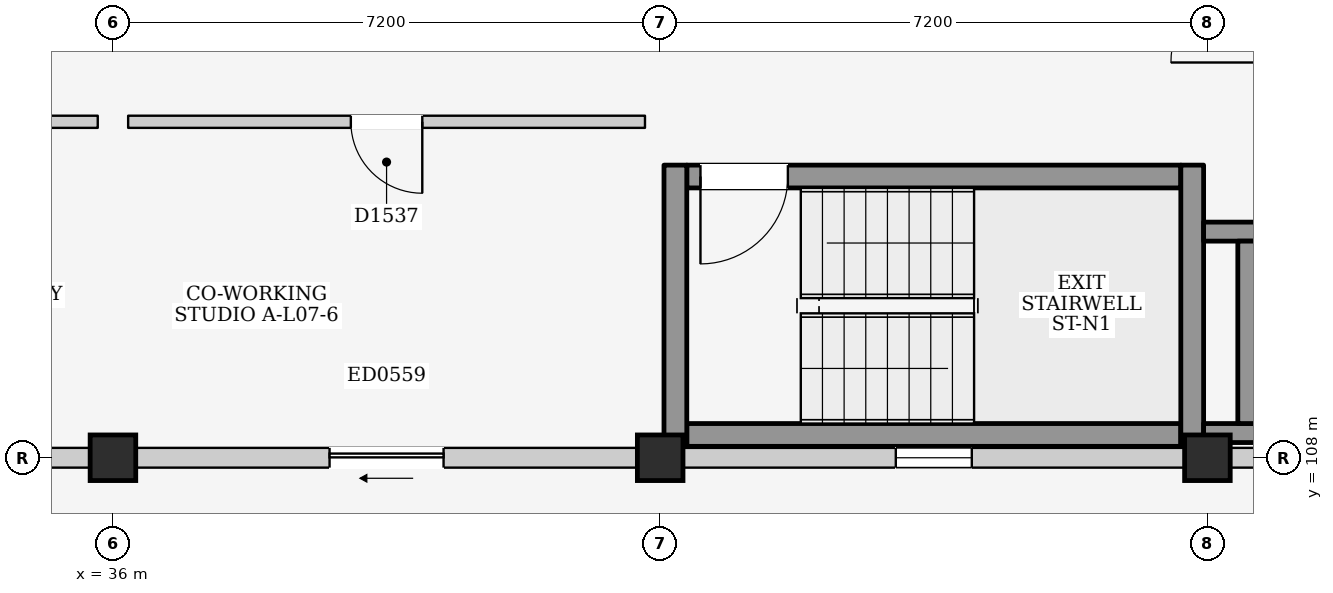
"""IFC4 building model, lengths in metres.
Left out: names, types, materials, properties, quantities, classifications, styles, units other than length and angle.
Written with IfcOpenShell. Run it as: python <this file> out.ifc"""

import sys

from ifc_helpers import new_model, si_unit, direction, frame, frame_2d, origin, origin_2d, place, context, subcontext, project, spatial, rectangle, extrude, element, fill, save


model = new_model("IFC4")
c1 = context("Model", 3, precision=1e-05, world=origin(), true_north=direction((0.0, 1.0)))
c2 = subcontext(c1, "Body", "Model", "MODEL_VIEW")
j1 = project(units=[si_unit("LENGTHUNIT", "METRE"), si_unit("PLANEANGLEUNIT", "RADIAN")], contexts=[c1])
p1 = place(None, origin())
s1 = spatial("IfcSite", under=j1, at=p1, CompositionType="ELEMENT")
p2 = place(p1, origin())
s2 = spatial("IfcBuilding", under=s1, at=p2, CompositionType="ELEMENT")
p3 = place(p2, frame((0.0, 0.0, 25.1)))
s3 = spatial("IfcBuildingStorey", under=s2, at=p3, CompositionType="ELEMENT", Elevation=25.1)
for number, where, z_axis, x_axis in (
    (1, (36.0, 108.0, 0.0), (0.0, 0.0, 1.0), (1.0, 0.0, 0.0)),
    (2, (43.2, 108.0, 0.0), (0.0, 0.0, 1.0), (1.0, 0.0, 0.0)),
    (3, (50.4, 108.0, 0.0), (0.0, 0.0, 1.0), (1.0, 0.0, 0.0)),
):
    element("IfcColumn", number, at=place(p3, frame(where, z_axis=z_axis, x_axis=x_axis)), inside=s3, PredefinedType="COLUMN", context=c2, shape_type="SweptSolid", body=[
        extrude(rectangle(XDim=0.6, YDim=0.6, at=origin_2d()), origin(), (0.0, 0.0, 1.0), 3.2),
    ])
p4 = place(p3, frame((29.1, 108.0, 0.0), z_axis=(0.0, 0.0, 1.0), x_axis=(1.0, 0.0, 0.0)))
e4 = element("IfcWall", 4, at=p4, inside=s3, PredefinedType="ELEMENTEDWALL", context=c2, shape_type="SweptSolid", body=[
    extrude(rectangle(XDim=6.6, YDim=0.26, at=frame_2d((3.3, 0.0))), origin(), (0.0, 0.0, 1.0), 2.325),
])
p5 = place(p4, frame((2.55, 0.0, 0.0)))
e5 = element("IfcOpeningElement", 5, at=p5, cuts=e4, PredefinedType="OPENING", context=c2, shape_type="SweptSolid", body=[
    extrude(rectangle(XDim=1.5, YDim=2.12, at=frame_2d((0.75, 1.06))), frame((0.0, 0.145, 0.0), z_axis=(0.0, -1.0, 0.0), x_axis=(1.0, 0.0, 0.0)), (0.0, 0.0, 1.0), 0.29),
])
p6 = place(p3, frame((36.3, 108.0, 0.0), z_axis=(0.0, 0.0, 1.0), x_axis=(1.0, 0.0, 0.0)))
e6 = element("IfcWall", 6, at=p6, inside=s3, PredefinedType="ELEMENTEDWALL", context=c2, shape_type="SweptSolid", body=[
    extrude(rectangle(XDim=6.6, YDim=0.26, at=frame_2d((3.3, 0.0))), origin(), (0.0, 0.0, 1.0), 2.325),
])
p7 = place(p6, frame((2.55, 0.0, 0.0)))
e7 = element("IfcOpeningElement", 7, at=p7, cuts=e6, PredefinedType="OPENING", context=c2, shape_type="SweptSolid", body=[
    extrude(rectangle(XDim=1.5, YDim=2.12, at=frame_2d((0.75, 1.06))), frame((0.0, 0.145, 0.0), z_axis=(0.0, -1.0, 0.0), x_axis=(1.0, 0.0, 0.0)), (0.0, 0.0, 1.0), 0.29),
])
p8 = place(p3, frame((43.5, 108.0, 0.0), z_axis=(0.0, 0.0, 1.0), x_axis=(1.0, 0.0, 0.0)))
e8 = element("IfcWall", 8, at=p8, inside=s3, PredefinedType="ELEMENTEDWALL", context=c2, shape_type="SweptSolid", body=[
    extrude(rectangle(XDim=6.6, YDim=0.26, at=frame_2d((3.3, 0.0))), origin(), (0.0, 0.0, 1.0), 2.325),
])
p9 = place(p8, frame((2.8, 0.0, 1.2)))
e9 = element("IfcOpeningElement", 9, at=p9, cuts=e8, PredefinedType="OPENING", context=c2, shape_type="SweptSolid", body=[
    extrude(rectangle(XDim=1.0, YDim=0.9, at=frame_2d((0.5, 0.45))), frame((0.0, 0.145, 0.0), z_axis=(0.0, -1.0, 0.0), x_axis=(1.0, 0.0, 0.0)), (0.0, 0.0, 1.0), 0.29),
])
p10 = place(p3, frame((50.7, 108.0, 0.0), z_axis=(0.0, 0.0, 1.0), x_axis=(1.0, 0.0, 0.0)))
e10 = element("IfcWall", 10, at=p10, inside=s3, PredefinedType="ELEMENTEDWALL", context=c2, shape_type="SweptSolid", body=[
    extrude(rectangle(XDim=6.6, YDim=0.26, at=frame_2d((3.3, 0.0))), origin(), (0.0, 0.0, 1.0), 2.325),
])
p11 = place(p10, frame((2.8, 0.0, 1.2)))
e11 = element("IfcOpeningElement", 11, at=p11, cuts=e10, PredefinedType="OPENING", context=c2, shape_type="SweptSolid", body=[
    extrude(rectangle(XDim=1.0, YDim=0.9, at=frame_2d((0.5, 0.45))), frame((0.0, 0.145, 0.0), z_axis=(0.0, -1.0, 0.0), x_axis=(1.0, 0.0, 0.0)), (0.0, 0.0, 1.0), 0.29),
])
p12 = place(p3, frame((43.55, 108.3, 0.0), z_axis=(0.0, 0.0, 1.0), x_axis=(1.0, 0.0, 0.0)))
e12 = element("IfcWall", 12, at=p12, inside=s3, PredefinedType="SHEAR", context=c2, shape_type="SweptSolid", body=[
    extrude(rectangle(XDim=6.5, YDim=0.3, at=frame_2d((3.25, 0.0))), origin(), (0.0, 0.0, 1.0), 2.99),
])
p13 = place(p3, frame((43.55, 111.7, 0.0), z_axis=(0.0, 0.0, 1.0), x_axis=(1.0, 0.0, 0.0)))
e13 = element("IfcWall", 13, at=p13, inside=s3, PredefinedType="SHEAR", context=c2, shape_type="SweptSolid", body=[
    extrude(rectangle(XDim=6.5, YDim=0.3, at=frame_2d((3.25, 0.0))), origin(), (0.0, 0.0, 1.0), 2.99),
])
p14 = place(p13, frame((0.18, 0.0, 0.0)))
e14 = element("IfcOpeningElement", 14, at=p14, cuts=e13, PredefinedType="OPENING", context=c2, shape_type="SweptSolid", body=[
    extrude(rectangle(XDim=1.15, YDim=2.2, at=frame_2d((0.575, 1.1))), frame((0.0, 0.165, 0.0), z_axis=(0.0, -1.0, 0.0), x_axis=(1.0, 0.0, 0.0)), (0.0, 0.0, 1.0), 0.33),
])
for number, where, z_axis, x_axis in (
    (15, (43.4, 108.15, 0.0), (0.0, 0.0, 1.0), (0.0, 1.0, 0.0)),
    (16, (50.2, 108.15, 0.0), (0.0, 0.0, 1.0), (0.0, 1.0, 0.0)),
):
    element("IfcWall", number, at=place(p3, frame(where, z_axis=z_axis, x_axis=x_axis)), inside=s3, PredefinedType="SHEAR", context=c2, shape_type="SweptSolid", body=[
        extrude(rectangle(XDim=3.7, YDim=0.3, at=frame_2d((1.85, 0.0))), origin(), (0.0, 0.0, 1.0), 2.99),
    ])
p15 = place(p3, frame((50.35, 108.325, 0.0), z_axis=(0.0, 0.0, 1.0), x_axis=(1.0, 0.0, 0.0)))
e17 = element("IfcWall", 17, at=p15, inside=s3, PredefinedType="SHEAR", context=c2, shape_type="SweptSolid", body=[
    extrude(rectangle(XDim=2.675, YDim=0.25, at=frame_2d((1.337, 0.0))), origin(), (0.0, 0.0, 1.0), 2.99),
])
p16 = place(p3, frame((50.35, 110.975, 0.0), z_axis=(0.0, 0.0, 1.0), x_axis=(1.0, 0.0, 0.0)))
e18 = element("IfcWall", 18, at=p16, inside=s3, PredefinedType="SHEAR", context=c2, shape_type="SweptSolid", body=[
    extrude(rectangle(XDim=2.675, YDim=0.25, at=frame_2d((1.337, 0.0))), origin(), (0.0, 0.0, 1.0), 2.99),
])
p17 = place(p16, frame((1.0, 0.0, 0.0)))
e19 = element("IfcOpeningElement", 19, at=p17, cuts=e18, PredefinedType="OPENING", context=c2, shape_type="SweptSolid", body=[
    extrude(rectangle(XDim=1.2, YDim=2.25, at=frame_2d((0.6, 1.125))), frame((0.0, 0.14, 0.0), z_axis=(0.0, -1.0, 0.0), x_axis=(1.0, 0.0, 0.0)), (0.0, 0.0, 1.0), 0.28),
])
p18 = place(p3, frame((50.925, 108.45, 0.0), z_axis=(0.0, 0.0, 1.0), x_axis=(0.0, 1.0, 0.0)))
e20 = element("IfcWall", 20, at=p18, inside=s3, PredefinedType="SHEAR", context=c2, shape_type="SweptSolid", body=[
    extrude(rectangle(XDim=2.4, YDim=0.25, at=frame_2d((1.2, 0.0))), origin(), (0.0, 0.0, 1.0), 2.99),
])
p19 = place(p3, frame((29.0, 112.42, 0.0), z_axis=(0.0, 0.0, 1.0), x_axis=(1.0, 0.0, 0.0)))
e21 = element("IfcWall", 21, at=p19, inside=s3, PredefinedType="PARTITIONING", context=c2, shape_type="SweptSolid", body=[
    extrude(rectangle(XDim=6.8, YDim=0.16, at=frame_2d((3.4, 0.0))), origin(), (0.0, 0.0, 1.0), 2.99),
])
p20 = place(p19, frame((2.93, 0.0, 0.0)))
e22 = element("IfcOpeningElement", 22, at=p20, cuts=e21, PredefinedType="OPENING", context=c2, shape_type="SweptSolid", body=[
    extrude(rectangle(XDim=0.94, YDim=2.12, at=frame_2d((0.47, 1.06))), frame((0.0, 0.095, 0.0), z_axis=(0.0, -1.0, 0.0), x_axis=(1.0, 0.0, 0.0)), (0.0, 0.0, 1.0), 0.19),
])
p21 = place(p3, frame((36.2, 112.42, 0.0), z_axis=(0.0, 0.0, 1.0), x_axis=(1.0, 0.0, 0.0)))
e23 = element("IfcWall", 23, at=p21, inside=s3, PredefinedType="PARTITIONING", context=c2, shape_type="SweptSolid", body=[
    extrude(rectangle(XDim=6.8, YDim=0.16, at=frame_2d((3.4, 0.0))), origin(), (0.0, 0.0, 1.0), 2.99),
])
p22 = place(p21, frame((2.93, 0.0, 0.0)))
e24 = element("IfcOpeningElement", 24, at=p22, cuts=e23, PredefinedType="OPENING", context=c2, shape_type="SweptSolid", body=[
    extrude(rectangle(XDim=0.94, YDim=2.12, at=frame_2d((0.47, 1.06))), frame((0.0, 0.095, 0.0), z_axis=(0.0, -1.0, 0.0), x_axis=(1.0, 0.0, 0.0)), (0.0, 0.0, 1.0), 0.19),
])
p23 = place(p7, frame((1.5, 0.0, 0.0), z_axis=(0.0, 0.0, 1.0), x_axis=(-1.0, 0.0, 0.0)))
e25 = element("IfcDoor", 25, at=p23, inside=s3, OperationType="SLIDING_TO_LEFT", PredefinedType="DOOR", context=c2, shape_type="SweptSolid", body=[
    extrude(rectangle(XDim=1.5, YDim=2.12, at=frame_2d((0.75, 1.06))), frame((0.0, 0.025, 0.0), z_axis=(0.0, -1.0, 0.0), x_axis=(1.0, 0.0, 0.0)), (0.0, 0.0, 1.0), 0.05),
])
fill(e7, e25)
p24 = place(p9, origin())
e26 = element("IfcWindow", 26, at=p24, inside=s3, PartitioningType="SINGLE_PANEL", PredefinedType="WINDOW", context=c2, shape_type="SweptSolid", body=[
    extrude(rectangle(XDim=1.0, YDim=0.9, at=frame_2d((0.5, 0.45))), frame((0.0, 0.03, 0.0), z_axis=(0.0, -1.0, 0.0), x_axis=(1.0, 0.0, 0.0)), (0.0, 0.0, 1.0), 0.06),
])
fill(e9, e26)
p25 = place(p14, frame((1.15, 0.0, 0.0), z_axis=(0.0, 0.0, 1.0), x_axis=(-1.0, 0.0, 0.0)))
e27 = element("IfcDoor", 27, at=p25, inside=s3, OperationType="SINGLE_SWING_RIGHT", PredefinedType="DOOR", context=c2, shape_type="SweptSolid", body=[
    extrude(rectangle(XDim=1.15, YDim=2.2, at=frame_2d((0.575, 1.1))), frame((0.0, 0.025, 0.0), z_axis=(0.0, -1.0, 0.0), x_axis=(1.0, 0.0, 0.0)), (0.0, 0.0, 1.0), 0.05),
])
fill(e14, e27)
p26 = place(p22, frame((0.94, 0.0, 0.0), z_axis=(0.0, 0.0, 1.0), x_axis=(-1.0, 0.0, 0.0)))
e28 = element("IfcDoor", 28, at=p26, inside=s3, OperationType="SINGLE_SWING_LEFT", PredefinedType="DOOR", context=c2, shape_type="SweptSolid", body=[
    extrude(rectangle(XDim=0.94, YDim=2.12, at=frame_2d((0.47, 1.06))), frame((0.0, 0.025, 0.0), z_axis=(0.0, -1.0, 0.0), x_axis=(1.0, 0.0, 0.0)), (0.0, 0.0, 1.0), 0.05),
])
fill(e24, e28)
save(model, sys.argv[1])
